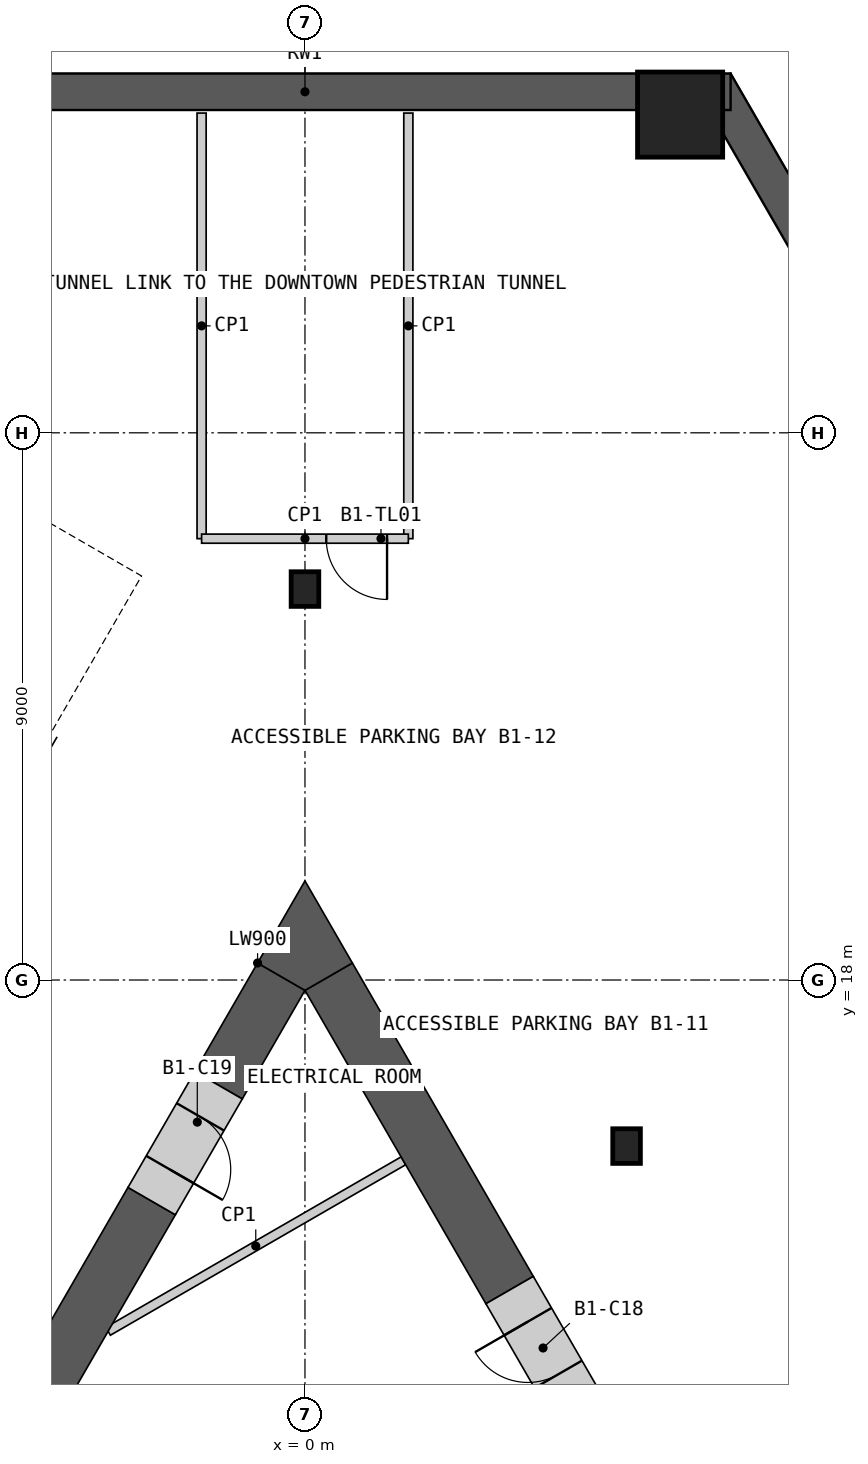
"""IFC4 building model, lengths in metres.
Left out: names, types, materials, properties, quantities, classifications, styles, units other than length and angle.
Written with IfcOpenShell. Run it as: python <this file> out.ifc"""

import sys

from ifc_helpers import new_model, si_unit, direction, frame, frame_2d, origin, origin_2d, place, context, subcontext, project, spatial, polyline, rectangle, hollow_rectangle, i_section, outline, extrude, element, fill, save


model = new_model("IFC4")
c1 = context("Model", 3, precision=1e-05, world=origin(), true_north=direction((0.0, 1.0)))
c2 = subcontext(c1, "Body", "Model", "MODEL_VIEW")
j1 = project(units=[si_unit("LENGTHUNIT", "METRE"), si_unit("PLANEANGLEUNIT", "RADIAN")], contexts=[c1])
p1 = place(None, origin())
s1 = spatial("IfcSite", under=j1, at=p1, CompositionType="ELEMENT")
p2 = place(p1, origin())
s2 = spatial("IfcBuilding", under=s1, at=p2, CompositionType="ELEMENT")
p3 = place(p2, frame((0.0, 0.0, -4.2)))
s3 = spatial("IfcBuildingStorey", under=s2, at=p3, CompositionType="ELEMENT", Elevation=-4.2)
p4 = place(p3, frame((31.74, -10.542, 0.0), z_axis=(0.0, 0.0, 1.0), x_axis=(-0.500000005698, 0.866025400495, 0.0)))
e1 = element("IfcWall", 1, at=p4, inside=s3, PredefinedType="SOLIDWALL", context=c2, shape_type="SweptSolid", body=[
    extrude(rectangle(XDim=50.0, YDim=0.6, at=frame_2d((25.0, 0.0))), origin(), (0.0, 0.0, 1.0), 3.75),
])
p5 = place(p3, frame((7.0, 32.609, 0.0), z_axis=(0.0, 0.0, 1.0), x_axis=(-1.0, 0.0, 0.0)))
e2 = element("IfcWall", 2, at=p5, inside=s3, PredefinedType="SOLIDWALL", context=c2, shape_type="SweptSolid", body=[
    extrude(rectangle(XDim=14.0, YDim=0.6, at=frame_2d((7.0, 0.0))), origin(), (0.0, 0.0, 1.0), 3.75),
])
p6 = place(p3, frame((6.17, 32.234, 0.0), z_axis=(0.0, 0.0, 1.0), x_axis=(1.0, 0.0, 0.0)))
e3 = element("IfcColumn", 3, at=p6, inside=s3, PredefinedType="COLUMN", context=c2, shape_type="SweptSolid", body=[
    extrude(hollow_rectangle(XDim=1.4, YDim=1.4, WallThickness=0.1, at=origin_2d()), origin(), (0.0, 0.0, 1.0), 4.2),
])
for number, where, z_axis, x_axis in (
    (4, (0.0, 24.43, 0.0), (0.0, 0.0, 1.0), (1.0, 0.0, 0.0)),
    (5, (5.289, 15.269, 0.0), (0.0, 0.0, 1.0), (1.0, 0.0, 0.0)),
):
    element("IfcColumn", number, at=place(p3, frame(where, z_axis=z_axis, x_axis=x_axis)), inside=s3, PredefinedType="COLUMN", context=c2, shape_type="SweptSolid", body=[
        extrude(i_section(OverallWidth=0.454, OverallDepth=0.57, WebThickness=0.078, FlangeThickness=0.125, at=origin_2d()), origin(), (0.0, 0.0, 1.0), 4.2),
    ])
p7 = place(p3, frame((1.619, 15.026, 0.0), z_axis=(0.0, 0.0, 1.0), x_axis=(-0.866015917575, -0.500016430238, 0.0)))
e6 = element("IfcWall", 6, at=p7, inside=s3, PredefinedType="PARTITIONING", context=c2, shape_type="SweptSolid", body=[
    extrude(rectangle(XDim=5.607, YDim=0.15, at=frame_2d((2.804, 0.0))), origin(), (0.0, 0.0, 1.0), 3.75),
])
p8 = place(p3, frame((3.365, 12.9, 0.0), z_axis=(0.0, 0.0, 1.0), x_axis=(-0.499981657175, 0.86603599376, 0.0)))
e7 = element("IfcWall", 7, at=p8, inside=s3, PredefinedType="SHEAR", context=c2, shape_type="SweptSolid", body=[
    extrude(rectangle(XDim=5.952, YDim=0.9, at=frame_2d((2.976, 0.0))), origin(), (0.0, 0.0, 1.0), 3.75),
])
p9 = place(p3, frame((-2.521, 14.364, 0.0), z_axis=(0.0, 0.0, 1.0), x_axis=(-0.500014099723, -0.866017263153, 0.0)))
e8 = element("IfcWall", 8, at=p9, inside=s3, PredefinedType="SHEAR", context=c2, shape_type="SweptSolid", body=[
    extrude(rectangle(XDim=5.048, YDim=0.9, at=frame_2d((2.524, 0.0))), origin(), (0.0, 0.0, 1.0), 3.75),
])
p10 = place(p3, frame((-0.39, 18.055, 0.0), z_axis=(0.0, 0.0, 1.0), x_axis=(-0.500009360108, -0.866019999656, 0.0)))
e9 = element("IfcWall", 9, at=p10, inside=s3, PredefinedType="SHEAR", context=c2, shape_type="SweptSolid", body=[
    extrude(rectangle(XDim=2.062, YDim=0.9, at=frame_2d((1.031, 0.0))), origin(), (0.0, 0.0, 1.0), 3.75),
])
p11 = place(p3, origin())
e10 = element("IfcWall", 10, at=p11, inside=s3, PredefinedType="SHEAR", context=c2, shape_type="SweptSolid", body=[
    extrude(outline(polyline([(-0.779, 18.28), (0.0, 19.63), (0.779, 18.28), (0.0, 17.83), (-0.779, 18.28)])), origin(), (0.0, 0.0, 1.0), 3.75),
])
p12 = place(p3, frame((4.466, 10.995, 0.0), z_axis=(0.0, 0.0, 1.0), x_axis=(-0.500077893725, 0.86598042715, 0.0)))
e11 = element("IfcWall", 11, at=p12, inside=s3, PredefinedType="SHEAR", context=c2, shape_type="SweptSolid", body=[
    extrude(rectangle(XDim=2.2, YDim=0.9, at=frame_2d((1.1, 0.0))), origin(), (0.0, 0.0, 1.0), 3.75),
])
p13 = place(p12, frame((0.6, 0.0, 0.0)))
e12 = element("IfcOpeningElement", 12, at=p13, cuts=e11, PredefinedType="OPENING", context=c2, shape_type="SweptSolid", body=[
    extrude(rectangle(XDim=1.0, YDim=2.1, at=frame_2d((0.5, 1.05))), frame((0.0, 0.46, 0.0), z_axis=(0.0, -1.0, 0.0), x_axis=(1.0, 0.0, 0.0)), (0.0, 0.0, 1.0), 0.92),
])
p14 = place(p3, frame((-1.421, 16.269, 0.0), z_axis=(0.0, 0.0, 1.0), x_axis=(-0.50002983664, -0.866008176907, 0.0)))
e13 = element("IfcWall", 13, at=p14, inside=s3, PredefinedType="SHEAR", context=c2, shape_type="SweptSolid", body=[
    extrude(rectangle(XDim=2.2, YDim=0.9, at=frame_2d((1.1, 0.0))), origin(), (0.0, 0.0, 1.0), 3.75),
])
p15 = place(p14, frame((0.6, 0.0, 0.0)))
e14 = element("IfcOpeningElement", 14, at=p15, cuts=e13, PredefinedType="OPENING", context=c2, shape_type="SweptSolid", body=[
    extrude(rectangle(XDim=1.0, YDim=2.1, at=frame_2d((0.5, 1.05))), frame((0.0, 0.46, 0.0), z_axis=(0.0, -1.0, 0.0), x_axis=(1.0, 0.0, 0.0)), (0.0, 0.0, 1.0), 0.92),
])
for number, where, z_axis, x_axis in (
    (15, (1.7, 32.259, 0.0), (0.0, 0.0, 1.0), (0.0, -1.0, 0.0)),
    (16, (-1.7, 25.259, 0.0), (0.0, 0.0, 1.0), (0.0, 1.0, 0.0)),
):
    element("IfcWall", number, at=place(p3, frame(where, z_axis=z_axis, x_axis=x_axis)), inside=s3, PredefinedType="PARTITIONING", context=c2, shape_type="SweptSolid", body=[
        extrude(rectangle(XDim=7.0, YDim=0.15, at=frame_2d((3.5, 0.0))), origin(), (0.0, 0.0, 1.0), 3.75),
    ])
p16 = place(p3, frame((1.7, 25.259, 0.0), z_axis=(0.0, 0.0, 1.0), x_axis=(-1.0, 0.0, 0.0)))
e17 = element("IfcWall", 17, at=p16, inside=s3, PredefinedType="PARTITIONING", context=c2, shape_type="SweptSolid", body=[
    extrude(rectangle(XDim=3.4, YDim=0.15, at=frame_2d((1.7, 0.0))), origin(), (0.0, 0.0, 1.0), 3.75),
])
p17 = place(p16, frame((0.35, 0.0, 0.0)))
e18 = element("IfcOpeningElement", 18, at=p17, cuts=e17, PredefinedType="OPENING", context=c2, shape_type="SweptSolid", body=[
    extrude(rectangle(XDim=1.0, YDim=2.1, at=frame_2d((0.5, 1.05))), frame((0.0, 0.085, 0.0), z_axis=(0.0, -1.0, 0.0), x_axis=(1.0, 0.0, 0.0)), (0.0, 0.0, 1.0), 0.17),
])
p18 = place(p13, origin())
e19 = element("IfcDoor", 19, at=p18, inside=s3, OperationType="SINGLE_SWING_RIGHT", PredefinedType="DOOR", context=c2, shape_type="SweptSolid", body=[
    extrude(rectangle(XDim=1.0, YDim=2.1, at=frame_2d((0.5, 1.05))), frame((0.0, 0.205, 0.0), z_axis=(0.0, -1.0, 0.0), x_axis=(1.0, 0.0, 0.0)), (0.0, 0.0, 1.0), 0.05),
])
fill(e12, e19)
p19 = place(p15, origin())
e20 = element("IfcDoor", 20, at=p19, inside=s3, OperationType="SINGLE_SWING_RIGHT", PredefinedType="DOOR", context=c2, shape_type="SweptSolid", body=[
    extrude(rectangle(XDim=1.0, YDim=2.1, at=frame_2d((0.5, 1.05))), frame((0.0, 0.205, 0.0), z_axis=(0.0, -1.0, 0.0), x_axis=(1.0, 0.0, 0.0)), (0.0, 0.0, 1.0), 0.05),
])
fill(e14, e20)
p20 = place(p17, origin())
e21 = element("IfcDoor", 21, at=p20, inside=s3, OperationType="SINGLE_SWING_LEFT", PredefinedType="DOOR", context=c2, shape_type="SweptSolid", body=[
    extrude(rectangle(XDim=1.0, YDim=2.1, at=frame_2d((0.5, 1.05))), frame((0.0, 0.025, 0.0), z_axis=(0.0, -1.0, 0.0), x_axis=(1.0, 0.0, 0.0)), (0.0, 0.0, 1.0), 0.05),
])
fill(e18, e21)
save(model, sys.argv[1])
